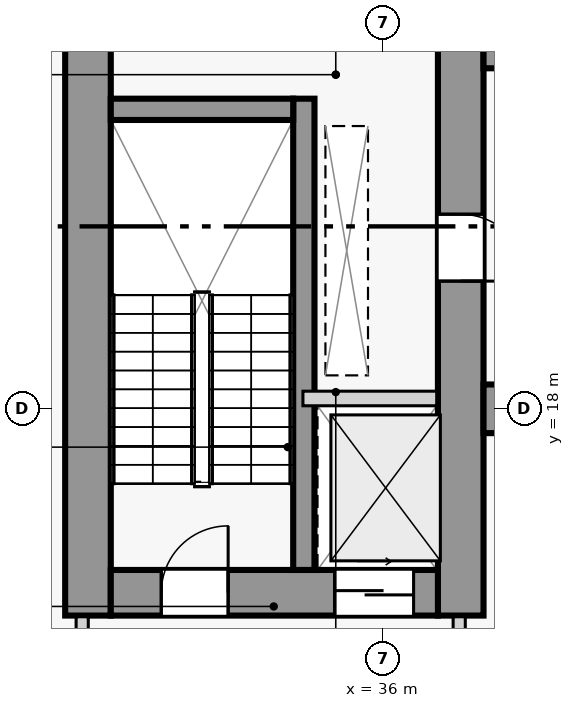
"""IFC4 building model, lengths in metres.
Left out: names, types, materials, properties, quantities, classifications, styles, units other than length and angle.
Written with IfcOpenShell. Run it as: python <this file> out.ifc"""

import sys

from ifc_helpers import new_model, si_unit, direction, frame, frame_2d, origin, place, context, subcontext, project, spatial, rectangle, extrude, source, transform, mapped, element, fill, save


model = new_model("IFC4")
c1 = context("Model", 3, precision=1e-05, world=origin(), true_north=direction((0.0, 1.0)))
c2 = subcontext(c1, "Body", "Model", "MODEL_VIEW")
j1 = project(units=[si_unit("LENGTHUNIT", "METRE"), si_unit("PLANEANGLEUNIT", "RADIAN")], contexts=[c1])
p1 = place(None, origin())
s1 = spatial("IfcSite", under=j1, at=p1, CompositionType="ELEMENT")
p2 = place(p1, origin())
s2 = spatial("IfcBuilding", under=s1, at=p2, CompositionType="ELEMENT")
p3 = place(p2, frame((0.0, 0.0, 148.5)))
s3 = spatial("IfcBuildingStorey", under=s2, at=p3, CompositionType="ELEMENT", Elevation=148.5)
p4 = place(p3, frame((31.145, 14.6, 0.0), z_axis=(0.0, 0.0, 1.0), x_axis=(0.0, 1.0, 0.0)))
e1 = element("IfcWall", 1, at=p4, inside=s3, PredefinedType="SHEAR", context=c2, shape_type="SweptSolid", body=[
    extrude(rectangle(XDim=12.85, YDim=0.75, at=frame_2d((6.425, 0.0))), origin(), (0.0, 0.0, 1.0), 7.2),
])
p5 = place(p3, frame((37.275, 14.6, 0.0), z_axis=(0.0, 0.0, 1.0), x_axis=(0.0, 1.0, 0.0)))
e2 = element("IfcWall", 2, at=p5, inside=s3, PredefinedType="SHEAR", context=c2, shape_type="SweptSolid", body=[
    extrude(rectangle(XDim=12.85, YDim=0.75, at=frame_2d((6.425, 0.0))), origin(), (0.0, 0.0, 1.0), 7.2),
])
p6 = place(p5, frame((5.5, 0.0, 0.0)))
e3 = element("IfcOpeningElement", 3, at=p6, cuts=e2, PredefinedType="OPENING", context=c2, shape_type="SweptSolid", body=[
    extrude(rectangle(XDim=1.1, YDim=2.2, at=frame_2d((0.55, 1.1))), frame((0.0, 0.385, 0.0), z_axis=(0.0, -1.0, 0.0), x_axis=(1.0, 0.0, 0.0)), (0.0, 0.0, 1.0), 0.77),
])
p7 = place(p3, frame((31.52, 14.975, 0.0), z_axis=(0.0, 0.0, 1.0), x_axis=(1.0, 0.0, 0.0)))
e4 = element("IfcWall", 4, at=p7, inside=s3, PredefinedType="SHEAR", context=c2, shape_type="SweptSolid", body=[
    extrude(rectangle(XDim=5.38, YDim=0.75, at=frame_2d((2.69, 0.0))), origin(), (0.0, 0.0, 1.0), 7.2),
])
p8 = place(p7, frame((0.83, 0.0, 0.0)))
e5 = element("IfcOpeningElement", 5, at=p8, cuts=e4, PredefinedType="OPENING", context=c2, shape_type="SweptSolid", body=[
    extrude(rectangle(XDim=1.1, YDim=2.2, at=frame_2d((0.55, 1.1))), frame((0.0, 0.385, 0.0), z_axis=(0.0, -1.0, 0.0), x_axis=(1.0, 0.0, 0.0)), (0.0, 0.0, 1.0), 0.77),
])
p9 = place(p7, frame((3.68, 0.0, 0.0)))
e6 = element("IfcOpeningElement", 6, at=p9, cuts=e4, PredefinedType="OPENING", context=c2, shape_type="SweptSolid", body=[
    extrude(rectangle(XDim=1.3, YDim=2.2, at=frame_2d((0.65, 1.1))), frame((0.0, 0.385, 0.0), z_axis=(0.0, -1.0, 0.0), x_axis=(1.0, 0.0, 0.0)), (0.0, 0.0, 1.0), 0.77),
])
p10 = place(p3, frame((34.695, 15.35, 0.0), z_axis=(0.0, 0.0, 1.0), x_axis=(0.0, 1.0, 0.0)))
e7 = element("IfcWall", 7, at=p10, inside=s3, PredefinedType="SHEAR", context=c2, shape_type="SweptSolid", body=[
    extrude(rectangle(XDim=7.75, YDim=0.35, at=frame_2d((3.875, 0.0))), origin(), (0.0, 0.0, 1.0), 7.2),
])
p11 = place(p3, frame((31.52, 22.925, 0.0), z_axis=(0.0, 0.0, 1.0), x_axis=(1.0, 0.0, 0.0)))
e8 = element("IfcWall", 8, at=p11, inside=s3, PredefinedType="SHEAR", context=c2, shape_type="SweptSolid", body=[
    extrude(rectangle(XDim=3.0, YDim=0.35, at=frame_2d((1.5, 0.0))), origin(), (0.0, 0.0, 1.0), 7.2),
])
for number, where, z_axis, x_axis in (
    (9, (37.65, 18.0, 0.0), (0.0, 0.0, 1.0), (1.0, 0.0, 0.0)),
    (10, (37.65, 24.0, 0.0), (0.0, 0.0, 1.0), (1.0, 0.0, 0.0)),
):
    element("IfcWall", number, at=place(p3, frame(where, z_axis=z_axis, x_axis=x_axis)), inside=s3, PredefinedType="SOLIDWALL", context=c2, shape_type="SweptSolid", body=[
        extrude(rectangle(XDim=6.7, YDim=0.8, at=frame_2d((3.35, 0.0))), origin(), (0.0, 0.0, 1.0), 6.55),
    ])
p12 = place(p3, frame((34.68, 18.17, 0.0), z_axis=(0.0, 0.0, 1.0), x_axis=(1.0, 0.0, 0.0)))
e11 = element("IfcWall", 11, at=p12, inside=s3, PredefinedType="PARTITIONING", context=c2, shape_type="SweptSolid", body=[
    extrude(rectangle(XDim=2.2, YDim=0.24, at=frame_2d((1.1, 0.0))), origin(), (0.0, 0.0, 1.0), 6.55),
])
p13 = place(p3, frame((31.05, 11.47, 0.0), z_axis=(0.0, 0.0, 1.0), x_axis=(0.0, 1.0, 0.0)))
e12 = element("IfcWall", 12, at=p13, inside=s3, PredefinedType="PARTITIONING", context=c2, shape_type="SweptSolid", body=[
    extrude(rectangle(XDim=3.11, YDim=0.2, at=frame_2d((1.555, 0.0))), origin(), (0.0, 0.0, 1.0), 4.95),
])
p14 = place(p3, frame((37.25, 11.47, 0.0), z_axis=(0.0, 0.0, 1.0), x_axis=(0.0, 1.0, 0.0)))
e13 = element("IfcWall", 13, at=p14, inside=s3, PredefinedType="PARTITIONING", context=c2, shape_type="SweptSolid", body=[
    extrude(rectangle(XDim=3.11, YDim=0.2, at=frame_2d((1.555, 0.0))), origin(), (0.0, 0.0, 1.0), 6.55),
])
m1 = source(origin(), c2, "Body", "SweptSolid", [
    extrude(rectangle(XDim=1.1, YDim=2.2, at=frame_2d((0.55, 1.1))), frame((0.0, 0.025, 0.0), z_axis=(0.0, -1.0, 0.0), x_axis=(1.0, 0.0, 0.0)), (0.0, 0.0, 1.0), 0.05),
])
p15 = place(p8, origin())
e14 = element("IfcDoor", 14, at=p15, inside=s3, OperationType="SINGLE_SWING_RIGHT", PredefinedType="DOOR", context=c2, shape_type="MappedRepresentation", body=[
    mapped(m1, transform((0.0, 0.0, 0.0), scale=1.0)),
])
fill(e5, e14)
m2 = source(origin(), c2, "Body", "SweptSolid", [
    extrude(rectangle(XDim=1.3, YDim=2.2, at=frame_2d((0.65, 1.1))), frame((0.0, 0.025, 0.0), z_axis=(0.0, -1.0, 0.0), x_axis=(1.0, 0.0, 0.0)), (0.0, 0.0, 1.0), 0.05),
])
p16 = place(p9, origin())
e15 = element("IfcDoor", 15, at=p16, inside=s3, OperationType="SLIDING_TO_RIGHT", PredefinedType="DOOR", context=c2, shape_type="MappedRepresentation", body=[
    mapped(m2, transform((0.0, 0.0, 0.0), scale=1.0)),
])
fill(e6, e15)
p17 = place(p6, frame((1.1, 0.0, 0.0), z_axis=(0.0, 0.0, 1.0), x_axis=(-1.0, 0.0, 0.0)))
e16 = element("IfcDoor", 16, at=p17, inside=s3, OperationType="SINGLE_SWING_RIGHT", PredefinedType="DOOR", context=c2, shape_type="MappedRepresentation", body=[
    mapped(m1, transform((0.0, 0.0, 0.0), scale=1.0)),
])
fill(e3, e16)
save(model, sys.argv[1])
